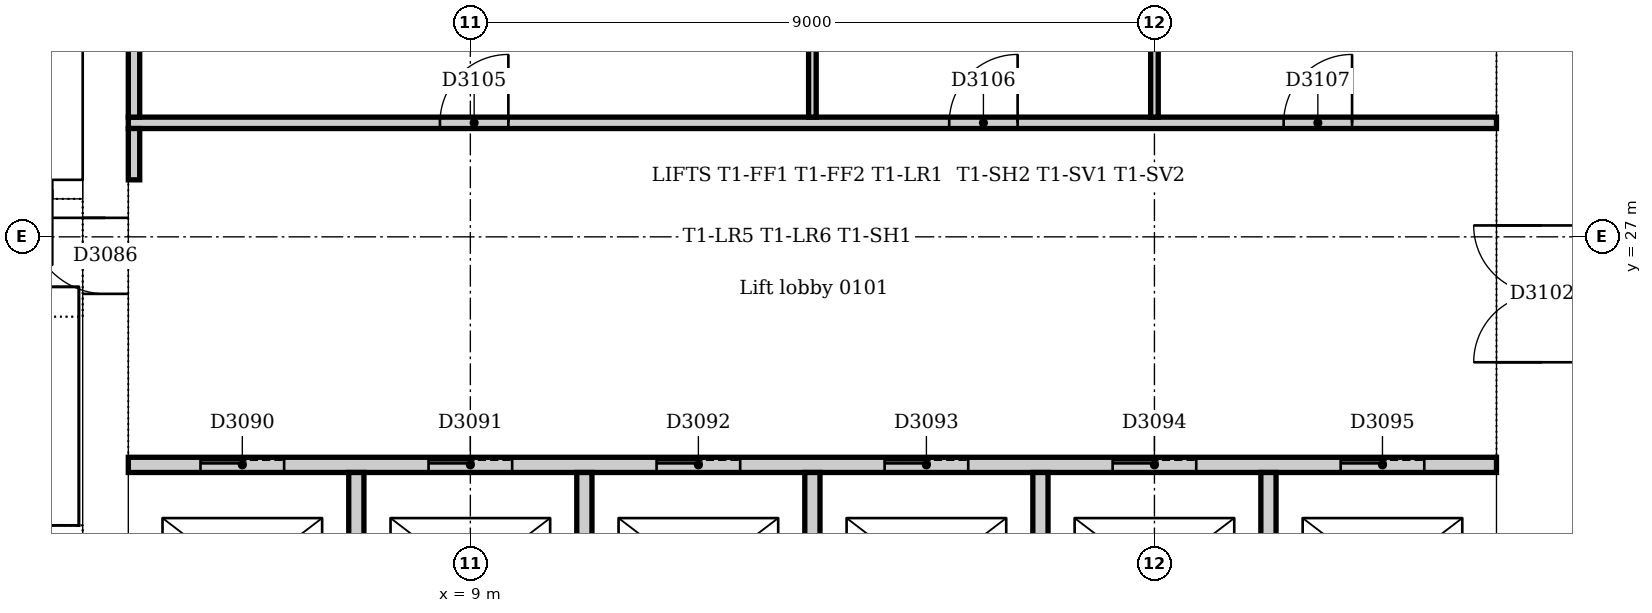
"""IFC4 building model, lengths in metres.
Left out: names, types, materials, properties, quantities, classifications, styles, units other than length and angle.
Written with IfcOpenShell. Run it as: python <this file> out.ifc"""

import sys

from ifc_helpers import new_model, si_unit, direction, frame, frame_2d, origin, place, context, subcontext, project, spatial, rectangle, extrude, element, fill, save


model = new_model("IFC4")
c1 = context("Model", 3, precision=1e-05, world=origin(), true_north=direction((0.0, 1.0)))
c2 = subcontext(c1, "Body", "Model", "MODEL_VIEW")
j1 = project(units=[si_unit("LENGTHUNIT", "METRE"), si_unit("PLANEANGLEUNIT", "RADIAN")], contexts=[c1])
p1 = place(None, origin())
s1 = spatial("IfcSite", under=j1, at=p1, CompositionType="ELEMENT")
p2 = place(p1, origin())
s2 = spatial("IfcBuilding", under=s1, at=p2, CompositionType="ELEMENT")
p3 = place(p2, frame((0.0, 0.0, 6.0)))
s3 = spatial("IfcBuildingStorey", under=s2, at=p3, CompositionType="ELEMENT", Elevation=6.0)
p4 = place(p3, frame((23.1, 21.0, 0.0), z_axis=(0.0, 0.0, 1.0), x_axis=(0.0, 1.0, 0.0)))
e1 = element("IfcWall", 1, at=p4, inside=s3, PredefinedType="SOLIDWALL", context=c2, shape_type="SweptSolid", body=[
    extrude(rectangle(XDim=10.5, YDim=1.2, at=frame_2d((5.25, 0.0))), origin(), (0.0, 0.0, 1.0), 5.0),
])
p5 = place(p4, frame((4.35, 0.0, 0.0)))
e2 = element("IfcOpeningElement", 2, at=p5, cuts=e1, PredefinedType="OPENING", context=c2, shape_type="SweptSolid", body=[
    extrude(rectangle(XDim=1.8, YDim=2.1, at=frame_2d((0.9, 1.05))), frame((0.0, 0.61, 0.0), z_axis=(0.0, -1.0, 0.0), x_axis=(1.0, 0.0, 0.0)), (0.0, 0.0, 1.0), 1.22),
])
p6 = place(p3, frame((4.2, 31.5, 0.0), z_axis=(0.0, 0.0, 1.0), x_axis=(0.0, -1.0, 0.0)))
e3 = element("IfcWall", 3, at=p6, inside=s3, PredefinedType="SOLIDWALL", context=c2, shape_type="SweptSolid", body=[
    extrude(rectangle(XDim=10.5, YDim=0.6, at=frame_2d((5.25, 0.0))), origin(), (0.0, 0.0, 1.0), 5.0),
])
p7 = place(p6, frame((4.25, 0.0, 0.0)))
e4 = element("IfcOpeningElement", 4, at=p7, cuts=e3, PredefinedType="OPENING", context=c2, shape_type="SweptSolid", body=[
    extrude(rectangle(XDim=1.0, YDim=2.1, at=frame_2d((0.5, 1.05))), frame((0.0, 0.31, 0.0), z_axis=(0.0, -1.0, 0.0), x_axis=(1.0, 0.0, 0.0)), (0.0, 0.0, 1.0), 0.62),
])
p8 = place(p3, frame((3.9, 27.625, 0.0), z_axis=(0.0, 0.0, 1.0), x_axis=(-1.0, 0.0, 0.0)))
e5 = element("IfcWall", 5, at=p8, inside=s3, PredefinedType="SOLIDWALL", context=c2, shape_type="SweptSolid", body=[
    extrude(rectangle(XDim=3.54, YDim=0.25, at=frame_2d((1.77, 0.0))), origin(), (0.0, 0.0, 1.0), 5.0),
])
p9 = place(p8, frame((0.4, 0.0, 0.0)))
e6 = element("IfcOpeningElement", 6, at=p9, cuts=e5, PredefinedType="OPENING", context=c2, shape_type="SweptSolid", body=[
    extrude(rectangle(XDim=1.0, YDim=2.1, at=frame_2d((0.5, 1.05))), frame((0.0, 0.135, 0.0), z_axis=(0.0, -1.0, 0.0), x_axis=(1.0, 0.0, 0.0)), (0.0, 0.0, 1.0), 0.27),
])
p10 = place(p3, frame((4.5, 24.0, 0.0), z_axis=(0.0, 0.0, 1.0), x_axis=(1.0, 0.0, 0.0)))
e7 = element("IfcWall", 7, at=p10, inside=s3, PredefinedType="PARTITIONING", context=c2, shape_type="SweptSolid", body=[
    extrude(rectangle(XDim=18.0, YDim=0.2, at=frame_2d((9.0, 0.0))), origin(), (0.0, 0.0, 1.0), 4.7),
])
p11 = place(p10, frame((0.95, 0.0, 0.0)))
e8 = element("IfcOpeningElement", 8, at=p11, cuts=e7, PredefinedType="OPENING", context=c2, shape_type="SweptSolid", body=[
    extrude(rectangle(XDim=1.1, YDim=2.1, at=frame_2d((0.55, 1.05))), frame((0.0, 0.11, 0.0), z_axis=(0.0, -1.0, 0.0), x_axis=(1.0, 0.0, 0.0)), (0.0, 0.0, 1.0), 0.22),
])
p12 = place(p10, frame((3.95, 0.0, 0.0)))
e9 = element("IfcOpeningElement", 9, at=p12, cuts=e7, PredefinedType="OPENING", context=c2, shape_type="SweptSolid", body=[
    extrude(rectangle(XDim=1.1, YDim=2.1, at=frame_2d((0.55, 1.05))), frame((0.0, 0.11, 0.0), z_axis=(0.0, -1.0, 0.0), x_axis=(1.0, 0.0, 0.0)), (0.0, 0.0, 1.0), 0.22),
])
p13 = place(p10, frame((6.95, 0.0, 0.0)))
e10 = element("IfcOpeningElement", 10, at=p13, cuts=e7, PredefinedType="OPENING", context=c2, shape_type="SweptSolid", body=[
    extrude(rectangle(XDim=1.1, YDim=2.1, at=frame_2d((0.55, 1.05))), frame((0.0, 0.11, 0.0), z_axis=(0.0, -1.0, 0.0), x_axis=(1.0, 0.0, 0.0)), (0.0, 0.0, 1.0), 0.22),
])
p14 = place(p10, frame((9.95, 0.0, 0.0)))
e11 = element("IfcOpeningElement", 11, at=p14, cuts=e7, PredefinedType="OPENING", context=c2, shape_type="SweptSolid", body=[
    extrude(rectangle(XDim=1.1, YDim=2.1, at=frame_2d((0.55, 1.05))), frame((0.0, 0.11, 0.0), z_axis=(0.0, -1.0, 0.0), x_axis=(1.0, 0.0, 0.0)), (0.0, 0.0, 1.0), 0.22),
])
p15 = place(p10, frame((12.95, 0.0, 0.0)))
e12 = element("IfcOpeningElement", 12, at=p15, cuts=e7, PredefinedType="OPENING", context=c2, shape_type="SweptSolid", body=[
    extrude(rectangle(XDim=1.1, YDim=2.1, at=frame_2d((0.55, 1.05))), frame((0.0, 0.11, 0.0), z_axis=(0.0, -1.0, 0.0), x_axis=(1.0, 0.0, 0.0)), (0.0, 0.0, 1.0), 0.22),
])
p16 = place(p10, frame((15.95, 0.0, 0.0)))
e13 = element("IfcOpeningElement", 13, at=p16, cuts=e7, PredefinedType="OPENING", context=c2, shape_type="SweptSolid", body=[
    extrude(rectangle(XDim=1.1, YDim=2.1, at=frame_2d((0.55, 1.05))), frame((0.0, 0.11, 0.0), z_axis=(0.0, -1.0, 0.0), x_axis=(1.0, 0.0, 0.0)), (0.0, 0.0, 1.0), 0.22),
])
for number, where, z_axis, x_axis in (
    (14, (7.5, 21.0, 0.0), (0.0, 0.0, 1.0), (0.0, 1.0, 0.0)),
    (15, (10.5, 21.0, 0.0), (0.0, 0.0, 1.0), (0.0, 1.0, 0.0)),
    (16, (13.5, 21.0, 0.0), (0.0, 0.0, 1.0), (0.0, 1.0, 0.0)),
    (17, (16.5, 21.0, 0.0), (0.0, 0.0, 1.0), (0.0, 1.0, 0.0)),
    (18, (19.5, 21.0, 0.0), (0.0, 0.0, 1.0), (0.0, 1.0, 0.0)),
):
    element("IfcWall", number, at=place(p3, frame(where, z_axis=z_axis, x_axis=x_axis)), inside=s3, PredefinedType="PARTITIONING", context=c2, shape_type="SweptSolid", body=[
        extrude(rectangle(XDim=2.9, YDim=0.2, at=frame_2d((1.45, 0.0))), origin(), (0.0, 0.0, 1.0), 4.7),
    ])
p17 = place(p3, frame((4.5, 28.5, 0.0), z_axis=(0.0, 0.0, 1.0), x_axis=(1.0, 0.0, 0.0)))
e19 = element("IfcWall", 19, at=p17, inside=s3, PredefinedType="PARTITIONING", context=c2, shape_type="SweptSolid", body=[
    extrude(rectangle(XDim=18.0, YDim=0.15, at=frame_2d((9.0, 0.0))), origin(), (0.0, 0.0, 1.0), 4.7),
])
p18 = place(p17, frame((4.1, 0.0, 0.0)))
e20 = element("IfcOpeningElement", 20, at=p18, cuts=e19, PredefinedType="OPENING", context=c2, shape_type="SweptSolid", body=[
    extrude(rectangle(XDim=0.9, YDim=2.1, at=frame_2d((0.45, 1.05))), frame((0.0, 0.085, 0.0), z_axis=(0.0, -1.0, 0.0), x_axis=(1.0, 0.0, 0.0)), (0.0, 0.0, 1.0), 0.17),
])
p19 = place(p17, frame((10.8, 0.0, 0.0)))
e21 = element("IfcOpeningElement", 21, at=p19, cuts=e19, PredefinedType="OPENING", context=c2, shape_type="SweptSolid", body=[
    extrude(rectangle(XDim=0.9, YDim=2.1, at=frame_2d((0.45, 1.05))), frame((0.0, 0.085, 0.0), z_axis=(0.0, -1.0, 0.0), x_axis=(1.0, 0.0, 0.0)), (0.0, 0.0, 1.0), 0.17),
])
p20 = place(p17, frame((15.2, 0.0, 0.0)))
e22 = element("IfcOpeningElement", 22, at=p20, cuts=e19, PredefinedType="OPENING", context=c2, shape_type="SweptSolid", body=[
    extrude(rectangle(XDim=0.9, YDim=2.1, at=frame_2d((0.45, 1.05))), frame((0.0, 0.085, 0.0), z_axis=(0.0, -1.0, 0.0), x_axis=(1.0, 0.0, 0.0)), (0.0, 0.0, 1.0), 0.17),
])
p21 = place(p3, frame((4.575, 27.75, 0.0), z_axis=(0.0, 0.0, 1.0), x_axis=(0.0, 1.0, 0.0)))
e23 = element("IfcWall", 23, at=p21, inside=s3, PredefinedType="PARTITIONING", context=c2, shape_type="SweptSolid", body=[
    extrude(rectangle(XDim=0.675, YDim=0.15, at=frame_2d((0.338, 0.0))), origin(), (0.0, 0.0, 1.0), 4.7),
])
p22 = place(p3, frame((4.575, 28.575, 0.0), z_axis=(0.0, 0.0, 1.0), x_axis=(0.0, 1.0, 0.0)))
e24 = element("IfcWall", 24, at=p22, inside=s3, PredefinedType="PARTITIONING", context=c2, shape_type="SweptSolid", body=[
    extrude(rectangle(XDim=2.675, YDim=0.15, at=frame_2d((1.337, 0.0))), origin(), (0.0, 0.0, 1.0), 4.7),
])
for number, where, z_axis, x_axis in (
    (25, (13.5, 28.575, 0.0), (0.0, 0.0, 1.0), (0.0, 1.0, 0.0)),
    (26, (18.0, 28.575, 0.0), (0.0, 0.0, 1.0), (0.0, 1.0, 0.0)),
):
    element("IfcWall", number, at=place(p3, frame(where, z_axis=z_axis, x_axis=x_axis)), inside=s3, PredefinedType="PARTITIONING", context=c2, shape_type="SweptSolid", body=[
        extrude(rectangle(XDim=2.675, YDim=0.1, at=frame_2d((1.337, 0.0))), origin(), (0.0, 0.0, 1.0), 4.7),
    ])
p23 = place(p7, frame((1.0, 0.0, 0.0), z_axis=(0.0, 0.0, 1.0), x_axis=(-1.0, 0.0, 0.0)))
e27 = element("IfcDoor", 27, at=p23, inside=s3, OperationType="SINGLE_SWING_RIGHT", PredefinedType="DOOR", context=c2, shape_type="SweptSolid", body=[
    extrude(rectangle(XDim=1.0, YDim=2.1, at=frame_2d((0.5, 1.05))), frame((0.0, 0.025, 0.0), z_axis=(0.0, -1.0, 0.0), x_axis=(1.0, 0.0, 0.0)), (0.0, 0.0, 1.0), 0.05),
])
fill(e4, e27)
p24 = place(p11, origin())
e28 = element("IfcDoor", 28, at=p24, inside=s3, OperationType="SLIDING_TO_LEFT", PredefinedType="DOOR", context=c2, shape_type="SweptSolid", body=[
    extrude(rectangle(XDim=1.1, YDim=2.1, at=frame_2d((0.55, 1.05))), frame((0.0, 0.025, 0.0), z_axis=(0.0, -1.0, 0.0), x_axis=(1.0, 0.0, 0.0)), (0.0, 0.0, 1.0), 0.05),
])
fill(e8, e28)
p25 = place(p12, origin())
e29 = element("IfcDoor", 29, at=p25, inside=s3, OperationType="SLIDING_TO_LEFT", PredefinedType="DOOR", context=c2, shape_type="SweptSolid", body=[
    extrude(rectangle(XDim=1.1, YDim=2.1, at=frame_2d((0.55, 1.05))), frame((0.0, 0.025, 0.0), z_axis=(0.0, -1.0, 0.0), x_axis=(1.0, 0.0, 0.0)), (0.0, 0.0, 1.0), 0.05),
])
fill(e9, e29)
p26 = place(p13, origin())
e30 = element("IfcDoor", 30, at=p26, inside=s3, OperationType="SLIDING_TO_LEFT", PredefinedType="DOOR", context=c2, shape_type="SweptSolid", body=[
    extrude(rectangle(XDim=1.1, YDim=2.1, at=frame_2d((0.55, 1.05))), frame((0.0, 0.025, 0.0), z_axis=(0.0, -1.0, 0.0), x_axis=(1.0, 0.0, 0.0)), (0.0, 0.0, 1.0), 0.05),
])
fill(e10, e30)
p27 = place(p14, origin())
e31 = element("IfcDoor", 31, at=p27, inside=s3, OperationType="SLIDING_TO_LEFT", PredefinedType="DOOR", context=c2, shape_type="SweptSolid", body=[
    extrude(rectangle(XDim=1.1, YDim=2.1, at=frame_2d((0.55, 1.05))), frame((0.0, 0.025, 0.0), z_axis=(0.0, -1.0, 0.0), x_axis=(1.0, 0.0, 0.0)), (0.0, 0.0, 1.0), 0.05),
])
fill(e11, e31)
p28 = place(p15, origin())
e32 = element("IfcDoor", 32, at=p28, inside=s3, OperationType="SLIDING_TO_LEFT", PredefinedType="DOOR", context=c2, shape_type="SweptSolid", body=[
    extrude(rectangle(XDim=1.1, YDim=2.1, at=frame_2d((0.55, 1.05))), frame((0.0, 0.025, 0.0), z_axis=(0.0, -1.0, 0.0), x_axis=(1.0, 0.0, 0.0)), (0.0, 0.0, 1.0), 0.05),
])
fill(e12, e32)
p29 = place(p16, origin())
e33 = element("IfcDoor", 33, at=p29, inside=s3, OperationType="SLIDING_TO_LEFT", PredefinedType="DOOR", context=c2, shape_type="SweptSolid", body=[
    extrude(rectangle(XDim=1.1, YDim=2.1, at=frame_2d((0.55, 1.05))), frame((0.0, 0.025, 0.0), z_axis=(0.0, -1.0, 0.0), x_axis=(1.0, 0.0, 0.0)), (0.0, 0.0, 1.0), 0.05),
])
fill(e13, e33)
p30 = place(p5, origin())
e34 = element("IfcDoor", 34, at=p30, inside=s3, OperationType="DOUBLE_DOOR_DOUBLE_SWING", PredefinedType="DOOR", context=c2, shape_type="SweptSolid", body=[
    extrude(rectangle(XDim=1.8, YDim=2.1, at=frame_2d((0.9, 1.05))), frame((0.0, 0.025, 0.0), z_axis=(0.0, -1.0, 0.0), x_axis=(1.0, 0.0, 0.0)), (0.0, 0.0, 1.0), 0.05),
])
fill(e2, e34)
p31 = place(p18, origin())
e35 = element("IfcDoor", 35, at=p31, inside=s3, OperationType="SINGLE_SWING_RIGHT", PredefinedType="DOOR", context=c2, shape_type="SweptSolid", body=[
    extrude(rectangle(XDim=0.9, YDim=2.1, at=frame_2d((0.45, 1.05))), frame((0.0, 0.025, 0.0), z_axis=(0.0, -1.0, 0.0), x_axis=(1.0, 0.0, 0.0)), (0.0, 0.0, 1.0), 0.05),
])
fill(e20, e35)
p32 = place(p19, origin())
e36 = element("IfcDoor", 36, at=p32, inside=s3, OperationType="SINGLE_SWING_RIGHT", PredefinedType="DOOR", context=c2, shape_type="SweptSolid", body=[
    extrude(rectangle(XDim=0.9, YDim=2.1, at=frame_2d((0.45, 1.05))), frame((0.0, 0.025, 0.0), z_axis=(0.0, -1.0, 0.0), x_axis=(1.0, 0.0, 0.0)), (0.0, 0.0, 1.0), 0.05),
])
fill(e21, e36)
p33 = place(p20, origin())
e37 = element("IfcDoor", 37, at=p33, inside=s3, OperationType="SINGLE_SWING_RIGHT", PredefinedType="DOOR", context=c2, shape_type="SweptSolid", body=[
    extrude(rectangle(XDim=0.9, YDim=2.1, at=frame_2d((0.45, 1.05))), frame((0.0, 0.025, 0.0), z_axis=(0.0, -1.0, 0.0), x_axis=(1.0, 0.0, 0.0)), (0.0, 0.0, 1.0), 0.05),
])
fill(e22, e37)
save(model, sys.argv[1])
